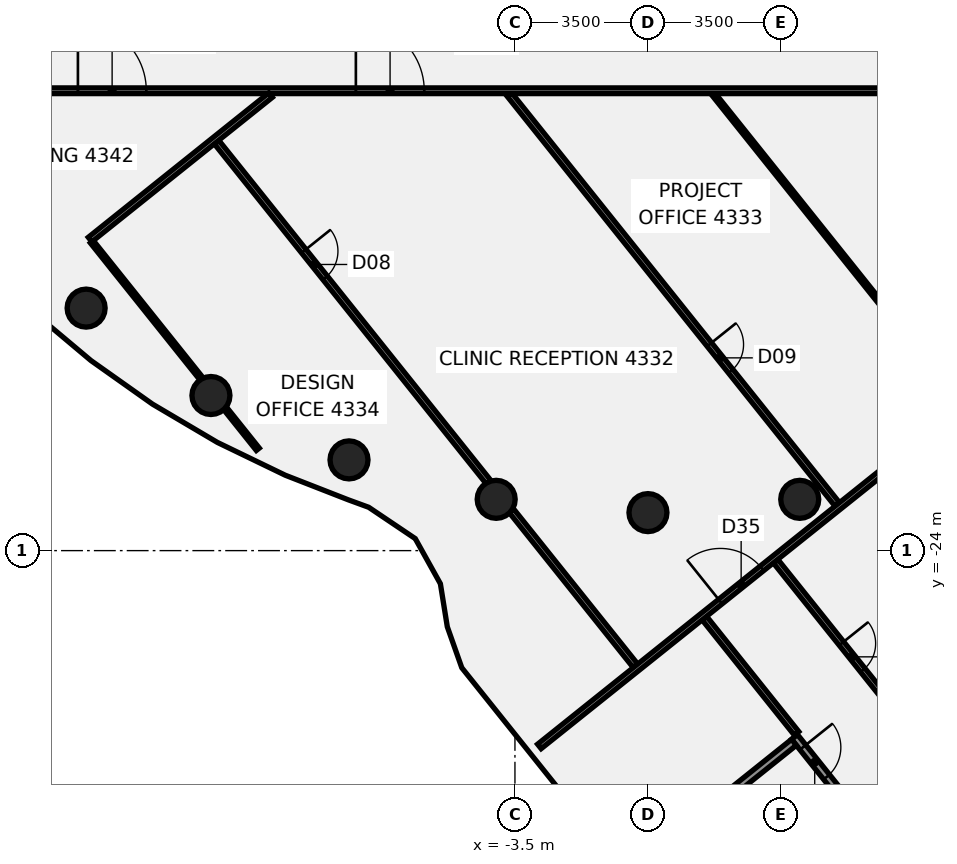
"""IFC4 building model, lengths in metres.
Left out: names, types, materials, properties, quantities, classifications, styles, units other than length and angle.
Written with IfcOpenShell. Run it as: python <this file> out.ifc"""

import sys

from ifc_helpers import new_model, si_unit, direction, frame, frame_2d, origin, origin_2d, place, context, subcontext, project, spatial, rectangle, circle, extrude, element, fill, save


model = new_model("IFC4")
c1 = context("Model", 3, precision=1e-05, world=origin(), true_north=direction((0.0, 1.0)))
c2 = subcontext(c1, "Body", "Model", "MODEL_VIEW")
j1 = project(units=[si_unit("LENGTHUNIT", "METRE"), si_unit("PLANEANGLEUNIT", "RADIAN")], contexts=[c1])
p1 = place(None, origin())
s1 = spatial("IfcSite", under=j1, at=p1, CompositionType="ELEMENT")
p2 = place(p1, origin())
s2 = spatial("IfcBuilding", under=s1, at=p2, CompositionType="ELEMENT")
p3 = place(p2, frame((0.0, 0.0, 174.25)))
s3 = spatial("IfcBuildingStorey", under=s2, at=p3, CompositionType="ELEMENT", Elevation=174.25)
for number, where, z_axis, x_axis in (
    (1, (-14.784, -17.619, -0.14), (0.0, 0.0, 1.0), (1.0, 0.0, 0.0)),
    (2, (-11.5, -19.919, -0.14), (0.0, 0.0, 1.0), (1.0, 0.0, 0.0)),
    (3, (-7.866, -21.613, -0.14), (0.0, 0.0, 1.0), (1.0, 0.0, 0.0)),
    (4, (-3.994, -22.651, -0.14), (0.0, 0.0, 1.0), (1.0, 0.0, 0.0)),
    (5, (0.0, -23.0, -0.14), (0.0, 0.0, 1.0), (1.0, 0.0, 0.0)),
    (6, (3.994, -22.651, -0.14), (0.0, 0.0, 1.0), (1.0, 0.0, 0.0)),
):
    element("IfcColumn", number, at=place(p3, frame(where, z_axis=z_axis, x_axis=x_axis)), inside=s3, PredefinedType="COLUMN", context=c2, shape_type="SweptSolid", body=[
        extrude(circle(Radius=0.5, at=origin_2d()), origin(), (0.0, 0.0, 1.0), 3.71),
    ])
p4 = place(p3, frame((-14.633, -15.874, 0.0), z_axis=(0.0, 0.0, 1.0), x_axis=(0.624636960835, -0.780915275276, 0.0)))
e7 = element("IfcWall", 7, at=p4, inside=s3, PredefinedType="PARTITIONING", context=c2, shape_type="SweptSolid", body=[
    extrude(rectangle(XDim=4.613, YDim=0.1, at=frame_2d((2.307, 0.0))), origin(), (0.0, 0.0, 1.0), 2.97),
])
p5 = place(p3, frame((-11.134, -20.249, 0.0), z_axis=(0.0, 0.0, 1.0), x_axis=(0.62463072699, -0.780920261551, 0.0)))
e8 = element("IfcWall", 8, at=p5, inside=s3, PredefinedType="PARTITIONING", context=c2, shape_type="SweptSolid", body=[
    extrude(rectangle(XDim=1.389, YDim=0.1, at=frame_2d((0.694, 0.0))), origin(), (0.0, 0.0, 1.0), 2.97),
])
p6 = place(p3, frame((-11.35, -13.253, 0.0), z_axis=(0.0, 0.0, 1.0), x_axis=(0.624656044028, -0.780900010667, 0.0)))
e9 = element("IfcWall", 9, at=p6, inside=s3, PredefinedType="PARTITIONING", context=c2, shape_type="SweptSolid", body=[
    extrude(rectangle(XDim=11.45, YDim=0.15, at=frame_2d((5.725, 0.0))), origin(), (0.0, 0.0, 1.0), 2.97),
])
p7 = place(p6, frame((3.67, 0.0, 0.0)))
e10 = element("IfcOpeningElement", 10, at=p7, cuts=e9, PredefinedType="OPENING", context=c2, shape_type="SweptSolid", body=[
    extrude(rectangle(XDim=0.9, YDim=2.1, at=frame_2d((0.45, 1.05))), frame((0.0, 0.085, 0.0), z_axis=(0.0, -1.0, 0.0), x_axis=(1.0, 0.0, 0.0)), (0.0, 0.0, 1.0), 0.17),
])
p8 = place(p3, frame((-3.595, -22.948, 0.0), z_axis=(0.0, 0.0, 1.0), x_axis=(0.62465516027, -0.7809007176, 0.0)))
e11 = element("IfcWall", 11, at=p8, inside=s3, PredefinedType="PARTITIONING", context=c2, shape_type="SweptSolid", body=[
    extrude(rectangle(XDim=5.225, YDim=0.15, at=frame_2d((2.613, 0.0))), origin(), (0.0, 0.0, 1.0), 2.97),
])
p9 = place(p3, frame((-3.641, -12.005, 0.0), z_axis=(0.0, 0.0, 1.0), x_axis=(0.62463894889, -0.78091368507, 0.0)))
e12 = element("IfcWall", 12, at=p9, inside=s3, PredefinedType="PARTITIONING", context=c2, shape_type="SweptSolid", body=[
    extrude(rectangle(XDim=13.799, YDim=0.15, at=frame_2d((6.9, 0.0))), origin(), (0.0, 0.0, 1.0), 2.87),
])
p10 = place(p9, frame((8.415, 0.0, 0.0)))
e13 = element("IfcOpeningElement", 13, at=p10, cuts=e12, PredefinedType="OPENING", context=c2, shape_type="SweptSolid", body=[
    extrude(rectangle(XDim=0.9, YDim=2.1, at=frame_2d((0.45, 1.05))), frame((0.0, 0.085, 0.0), z_axis=(0.0, -1.0, 0.0), x_axis=(1.0, 0.0, 0.0)), (0.0, 0.0, 1.0), 0.17),
])
p11 = place(p3, frame((1.487, -25.78, 0.0), z_axis=(0.0, 0.0, 1.0), x_axis=(0.624664354655, -0.780893362774, 0.0)))
e14 = element("IfcWall", 14, at=p11, inside=s3, PredefinedType="PARTITIONING", context=c2, shape_type="SweptSolid", body=[
    extrude(rectangle(XDim=3.88, YDim=0.15, at=frame_2d((1.94, 0.0))), origin(), (0.0, 0.0, 1.0), 2.87),
])
p12 = place(p3, frame((1.725, -11.99, 0.0), z_axis=(0.0, 0.0, 1.0), x_axis=(0.624690839768, -0.780872175654, 0.0)))
e15 = element("IfcWall", 15, at=p12, inside=s3, PredefinedType="PARTITIONING", context=c2, shape_type="SweptSolid", body=[
    extrude(rectangle(XDim=14.152, YDim=0.1, at=frame_2d((7.076, 0.0))), origin(), (0.0, 0.0, 1.0), 2.97),
])
p13 = place(p3, frame((3.361, -24.281, 0.0), z_axis=(0.0, 0.0, 1.0), x_axis=(0.624663337309, -0.780894176584, 0.0)))
e16 = element("IfcWall", 16, at=p13, inside=s3, PredefinedType="PARTITIONING", context=c2, shape_type="SweptSolid", body=[
    extrude(rectangle(XDim=17.84, YDim=0.15, at=frame_2d((8.92, 0.0))), origin(), (0.0, 0.0, 1.0), 2.87),
])
p14 = place(p13, frame((2.77, 0.0, 0.0)))
e17 = element("IfcOpeningElement", 17, at=p14, cuts=e16, PredefinedType="OPENING", context=c2, shape_type="SweptSolid", body=[
    extrude(rectangle(XDim=0.9, YDim=2.1, at=frame_2d((0.45, 1.05))), frame((0.0, 0.085, 0.0), z_axis=(0.0, -1.0, 0.0), x_axis=(1.0, 0.0, 0.0)), (0.0, 0.0, 1.0), 0.17),
])
p15 = place(p13, frame((14.17, 0.0, 0.0)))
e18 = element("IfcOpeningElement", 18, at=p15, cuts=e16, PredefinedType="OPENING", context=c2, shape_type="SweptSolid", body=[
    extrude(rectangle(XDim=0.9, YDim=2.1, at=frame_2d((0.45, 1.05))), frame((0.0, 0.085, 0.0), z_axis=(0.0, -1.0, 0.0), x_axis=(1.0, 0.0, 0.0)), (0.0, 0.0, 1.0), 0.17),
])
p16 = place(p3, frame((-17.1, -11.9, 0.0), z_axis=(0.0, 0.0, 1.0), x_axis=(1.0, 0.0, 0.0)))
e19 = element("IfcWall", 19, at=p16, inside=s3, PredefinedType="PARTITIONING", context=c2, shape_type="SweptSolid", body=[
    extrude(rectangle(XDim=34.165, YDim=0.15, at=frame_2d((17.083, 0.0))), origin(), (0.0, 0.0, 1.0), 2.97),
])
p17 = place(p16, frame((9.414, 0.0, 0.0)))
e20 = element("IfcOpeningElement", 20, at=p17, cuts=e19, PredefinedType="OPENING", context=c2, shape_type="SweptSolid", body=[
    extrude(rectangle(XDim=1.8, YDim=2.1, at=frame_2d((0.9, 1.05))), frame((0.0, 0.085, 0.0), z_axis=(0.0, -1.0, 0.0), x_axis=(1.0, 0.0, 0.0)), (0.0, 0.0, 1.0), 0.17),
])
p18 = place(p16, frame((2.1, 0.0, 0.0)))
e21 = element("IfcOpeningElement", 21, at=p18, cuts=e19, PredefinedType="OPENING", context=c2, shape_type="SweptSolid", body=[
    extrude(rectangle(XDim=1.8, YDim=2.1, at=frame_2d((0.9, 1.05))), frame((0.0, 0.085, 0.0), z_axis=(0.0, -1.0, 0.0), x_axis=(1.0, 0.0, 0.0)), (0.0, 0.0, 1.0), 0.17),
])
p19 = place(p16, frame((23.853, 0.0, 0.0)))
e22 = element("IfcOpeningElement", 22, at=p19, cuts=e19, PredefinedType="OPENING", context=c2, shape_type="SweptSolid", body=[
    extrude(rectangle(XDim=1.8, YDim=2.1, at=frame_2d((0.9, 1.05))), frame((0.0, 0.085, 0.0), z_axis=(0.0, -1.0, 0.0), x_axis=(1.0, 0.0, 0.0)), (0.0, 0.0, 1.0), 0.17),
])
p20 = place(p3, frame((-14.68, -15.815, 0.0), z_axis=(0.0, 0.0, 1.0), x_axis=(0.780857060807, 0.624709733066, 0.0)))
e23 = element("IfcWall", 23, at=p20, inside=s3, PredefinedType="PARTITIONING", context=c2, shape_type="SweptSolid", body=[
    extrude(rectangle(XDim=6.082, YDim=0.15, at=frame_2d((3.041, 0.0))), origin(), (0.0, 0.0, 1.0), 2.97),
])
p21 = place(p3, frame((-2.857, -29.152, 0.0), z_axis=(0.0, 0.0, 1.0), x_axis=(0.780870482163, 0.624692956649, 0.0)))
e24 = element("IfcWall", 24, at=p21, inside=s3, PredefinedType="PARTITIONING", context=c2, shape_type="SweptSolid", body=[
    extrude(rectangle(XDim=14.24, YDim=0.15, at=frame_2d((7.12, 0.0))), origin(), (0.0, 0.0, 1.0), 2.87),
])
p22 = place(p21, frame((6.099, 0.0, 0.0)))
e25 = element("IfcOpeningElement", 25, at=p22, cuts=e24, PredefinedType="OPENING", context=c2, shape_type="SweptSolid", body=[
    extrude(rectangle(XDim=1.4, YDim=2.1, at=frame_2d((0.7, 1.05))), frame((0.0, 0.085, 0.0), z_axis=(0.0, -1.0, 0.0), x_axis=(1.0, 0.0, 0.0)), (0.0, 0.0, 1.0), 0.17),
])
p23 = place(p3, frame((3.857, -28.903, -0.14), z_axis=(0.0, 0.0, 1.0), x_axis=(0.624672828433, -0.780886584222, 0.0)))
e26 = element("IfcWall", 26, at=p23, inside=s3, PredefinedType="SHEAR", context=c2, shape_type="SweptSolid", body=[
    extrude(rectangle(XDim=6.7, YDim=0.2, at=frame_2d((3.35, 0.0))), origin(), (0.0, 0.0, 1.0), 3.01),
])
p24 = place(p23, frame((0.35, 0.0, 0.0)))
e27 = element("IfcOpeningElement", 27, at=p24, cuts=e26, PredefinedType="OPENING", context=c2, shape_type="SweptSolid", body=[
    extrude(rectangle(XDim=1.0, YDim=2.1, at=frame_2d((0.5, 1.05))), frame((0.0, 0.11, 0.0), z_axis=(0.0, -1.0, 0.0), x_axis=(1.0, 0.0, 0.0)), (0.0, 0.0, 1.0), 0.22),
])
p25 = place(p3, frame((1.343, -31.042, -0.14), z_axis=(0.0, 0.0, 1.0), x_axis=(0.780906026403, 0.624648523514, 0.0)))
e28 = element("IfcWall", 28, at=p25, inside=s3, PredefinedType="SHEAR", context=c2, shape_type="SweptSolid", body=[
    extrude(rectangle(XDim=3.2, YDim=0.2, at=frame_2d((1.6, 0.0))), origin(), (0.0, 0.0, 1.0), 3.01),
])
p26 = place(p7, frame((0.9, 0.0, 0.0), z_axis=(0.0, 0.0, 1.0), x_axis=(-1.0, 0.0, 0.0)))
e29 = element("IfcDoor", 29, at=p26, inside=s3, OperationType="SINGLE_SWING_LEFT", PredefinedType="DOOR", context=c2, shape_type="SweptSolid", body=[
    extrude(rectangle(XDim=0.9, YDim=2.1, at=frame_2d((0.45, 1.05))), frame((0.0, 0.025, 0.0), z_axis=(0.0, -1.0, 0.0), x_axis=(1.0, 0.0, 0.0)), (0.0, 0.0, 1.0), 0.05),
])
fill(e10, e29)
p27 = place(p10, origin())
e30 = element("IfcDoor", 30, at=p27, inside=s3, OperationType="SINGLE_SWING_LEFT", PredefinedType="DOOR", context=c2, shape_type="SweptSolid", body=[
    extrude(rectangle(XDim=0.9, YDim=2.1, at=frame_2d((0.45, 1.05))), frame((0.0, 0.025, 0.0), z_axis=(0.0, -1.0, 0.0), x_axis=(1.0, 0.0, 0.0)), (0.0, 0.0, 1.0), 0.05),
])
fill(e13, e30)
p28 = place(p14, origin())
e31 = element("IfcDoor", 31, at=p28, inside=s3, OperationType="SINGLE_SWING_RIGHT", PredefinedType="DOOR", context=c2, shape_type="SweptSolid", body=[
    extrude(rectangle(XDim=0.9, YDim=2.1, at=frame_2d((0.45, 1.05))), frame((0.0, 0.025, 0.0), z_axis=(0.0, -1.0, 0.0), x_axis=(1.0, 0.0, 0.0)), (0.0, 0.0, 1.0), 0.05),
])
fill(e17, e31)
p29 = place(p17, origin())
e32 = element("IfcDoor", 32, at=p29, inside=s3, OperationType="DOUBLE_DOOR_SINGLE_SWING", PredefinedType="DOOR", context=c2, shape_type="SweptSolid", body=[
    extrude(rectangle(XDim=1.8, YDim=2.1, at=frame_2d((0.9, 1.05))), frame((0.0, 0.025, 0.0), z_axis=(0.0, -1.0, 0.0), x_axis=(1.0, 0.0, 0.0)), (0.0, 0.0, 1.0), 0.05),
])
fill(e20, e32)
p30 = place(p18, frame((1.8, 0.0, 0.0), z_axis=(0.0, 0.0, 1.0), x_axis=(-1.0, 0.0, 0.0)))
e33 = element("IfcDoor", 33, at=p30, inside=s3, OperationType="DOUBLE_DOOR_SINGLE_SWING", PredefinedType="DOOR", context=c2, shape_type="SweptSolid", body=[
    extrude(rectangle(XDim=1.8, YDim=2.1, at=frame_2d((0.9, 1.05))), frame((0.0, 0.025, 0.0), z_axis=(0.0, -1.0, 0.0), x_axis=(1.0, 0.0, 0.0)), (0.0, 0.0, 1.0), 0.05),
])
fill(e21, e33)
p31 = place(p22, origin())
e34 = element("IfcDoor", 34, at=p31, inside=s3, OperationType="DOUBLE_DOOR_SINGLE_SWING", PredefinedType="DOOR", context=c2, shape_type="SweptSolid", body=[
    extrude(rectangle(XDim=1.4, YDim=2.1, at=frame_2d((0.7, 1.05))), frame((0.0, 0.025, 0.0), z_axis=(0.0, -1.0, 0.0), x_axis=(1.0, 0.0, 0.0)), (0.0, 0.0, 1.0), 0.05),
])
fill(e25, e34)
p32 = place(p24, origin())
e35 = element("IfcDoor", 35, at=p32, inside=s3, OperationType="SINGLE_SWING_LEFT", PredefinedType="DOOR", context=c2, shape_type="SweptSolid", body=[
    extrude(rectangle(XDim=1.0, YDim=2.1, at=frame_2d((0.5, 1.05))), frame((0.0, 0.025, 0.0), z_axis=(0.0, -1.0, 0.0), x_axis=(1.0, 0.0, 0.0)), (0.0, 0.0, 1.0), 0.05),
])
fill(e27, e35)
save(model, sys.argv[1])
